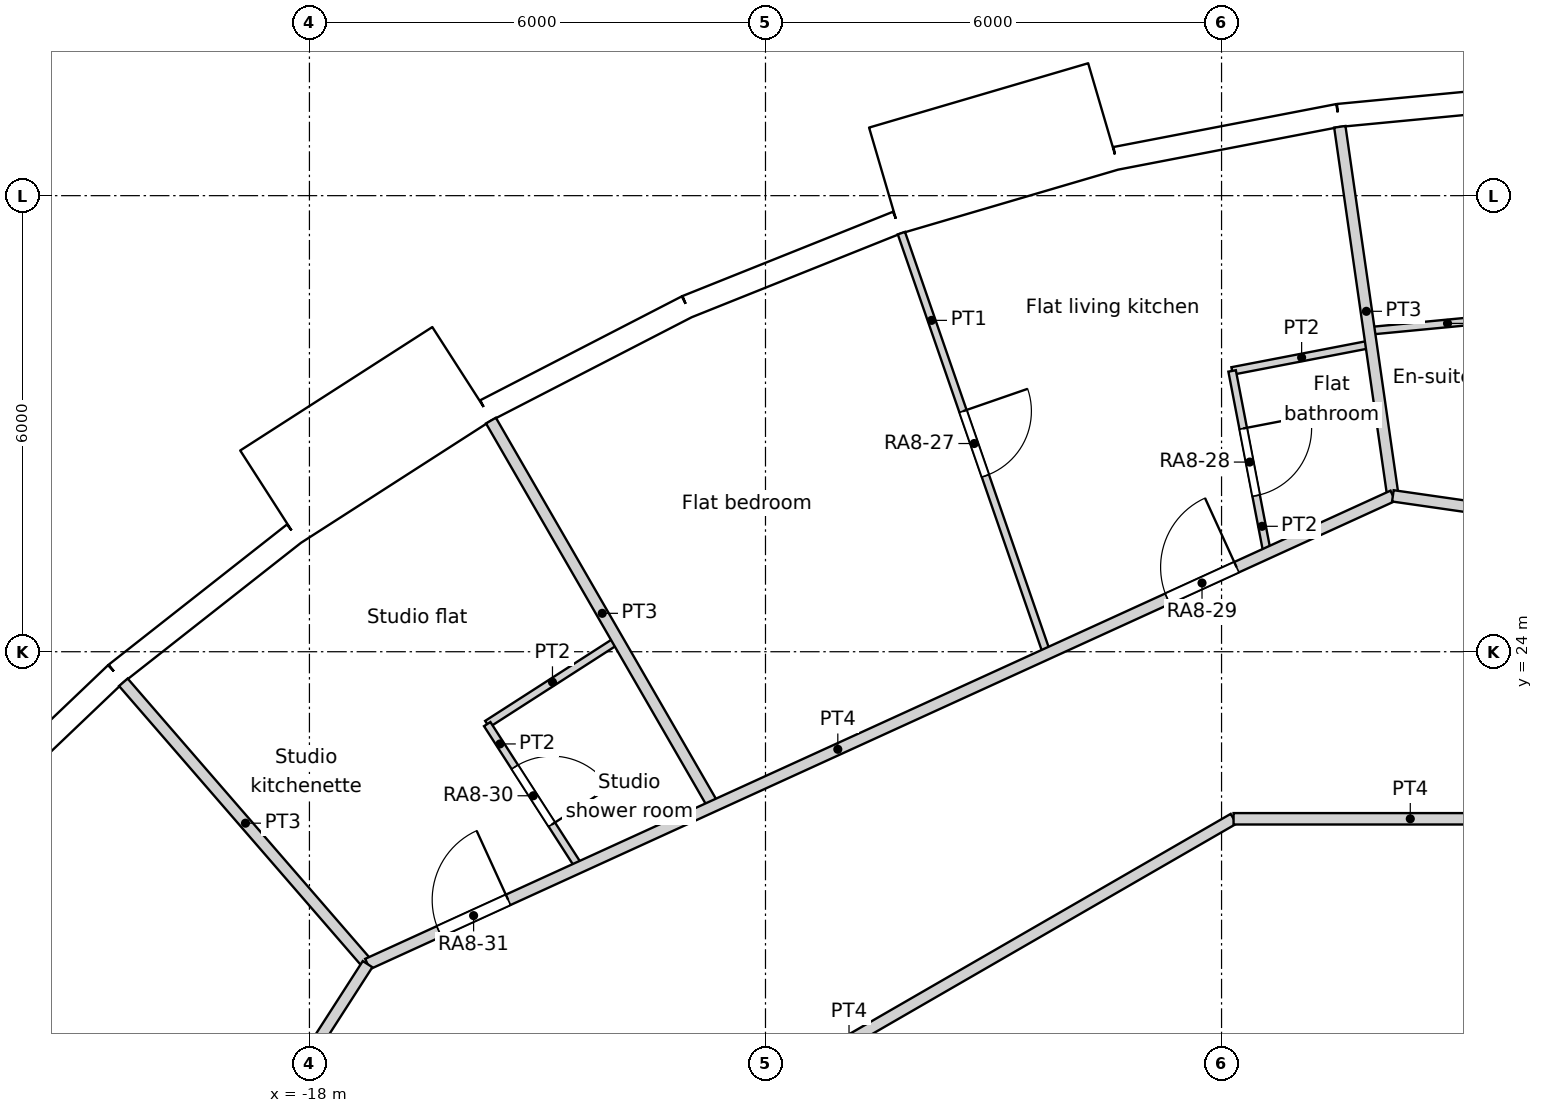
"""IFC4 building model, lengths in metres.
Left out: names, types, materials, properties, quantities, classifications, styles, units other than length and angle.
Written with IfcOpenShell. Run it as: python <this file> out.ifc"""

import sys

from ifc_helpers import new_model, si_unit, direction, frame, frame_2d, origin, origin_2d, place, context, subcontext, project, spatial, rectangle, circle, extrude, element, fill, save


model = new_model("IFC4")
c1 = context("Model", 3, precision=1e-05, world=origin(), true_north=direction((0.0, 1.0)))
c2 = subcontext(c1, "Body", "Model", "MODEL_VIEW")
j1 = project(units=[si_unit("LENGTHUNIT", "METRE"), si_unit("PLANEANGLEUNIT", "RADIAN")], contexts=[c1])
p1 = place(None, origin())
s1 = spatial("IfcSite", under=j1, at=p1, CompositionType="ELEMENT")
p2 = place(p1, origin())
s2 = spatial("IfcBuilding", under=s1, at=p2, CompositionType="ELEMENT")
p3 = place(p2, frame((0.0, 0.0, 103.8)))
s3 = spatial("IfcBuildingStorey", under=s2, at=p3, CompositionType="ELEMENT", Elevation=103.8)
for number, where, z_axis, x_axis in (
    (1, (-4.309, 29.966, 0.0), (0.0, 0.0, 1.0), (1.0, 0.0, 0.0)),
    (2, (-9.902, 28.61, 0.0), (0.0, 0.0, 1.0), (1.0, 0.0, 0.0)),
    (3, (-15.137, 26.219, 0.0), (0.0, 0.0, 1.0), (1.0, 0.0, 0.0)),
    (4, (-19.826, 22.88, 0.0), (0.0, 0.0, 1.0), (1.0, 0.0, 0.0)),
):
    element("IfcColumn", number, at=place(p3, frame(where, z_axis=z_axis, x_axis=x_axis)), inside=s3, PredefinedType="COLUMN", context=c2, shape_type="SweptSolid", body=[
        extrude(circle(Radius=0.6, at=origin_2d()), origin(), (0.0, 0.0, 1.0), 3.6),
    ])
for number, where, z_axis, x_axis in (
    (5, (-7.04, 23.516, 0.0), (0.0, 0.0, 1.0), (1.0, 0.0, 0.0)),
    (6, (-12.274, 21.259, 0.0), (0.0, 0.0, 1.0), (1.0, 0.0, 0.0)),
):
    element("IfcColumn", number, at=place(p3, frame(where, z_axis=z_axis, x_axis=x_axis)), inside=s3, PredefinedType="COLUMN", context=c2, shape_type="SweptSolid", body=[
        extrude(circle(Radius=0.65, at=origin_2d()), origin(), (0.0, 0.0, 1.0), 3.6),
    ])
p4 = place(p3, frame((-4.188, 18.35, 0.0), z_axis=(0.0, 0.0, 1.0), x_axis=(1.0, 0.0, 0.0)))
e7 = element("IfcColumn", 7, at=p4, inside=s3, PredefinedType="COLUMN", context=c2, shape_type="SweptSolid", body=[
    extrude(circle(Radius=0.7, at=origin_2d()), origin(), (0.0, 0.0, 1.0), 3.6),
])
p5 = place(p3, frame((-1.499, 31.338, 0.0), z_axis=(0.0, 0.0, 1.0), x_axis=(-0.995473351551, -0.095041077185, 0.0)))
e8 = element("IfcWall", 8, at=p5, inside=s3, PredefinedType="SOLIDWALL", context=c2, shape_type="SweptSolid", body=[
    extrude(rectangle(XDim=2.98, YDim=0.3, at=frame_2d((1.49, 0.0))), origin(), (0.0, 0.0, 1.0), 3.15),
])
p6 = place(p5, frame((1.49, 0.0, 1.55)))
e9 = element("IfcOpeningElement", 9, at=p6, cuts=e8, PredefinedType="OPENING", context=c2, shape_type="SweptSolid", body=[
    extrude(circle(Radius=0.9, at=origin_2d()), frame((0.0, 0.16, 0.0), z_axis=(0.0, -1.0, 0.0), x_axis=(1.0, 0.0, 0.0)), (0.0, 0.0, 1.0), 0.32),
])
p7 = place(p3, frame((-4.465, 31.055, 0.0), z_axis=(0.0, 0.0, 1.0), x_axis=(-0.981924535406, -0.189272836848, 0.0)))
e10 = element("IfcWall", 10, at=p7, inside=s3, PredefinedType="SOLIDWALL", context=c2, shape_type="SweptSolid", body=[
    extrude(rectangle(XDim=2.98, YDim=0.3, at=frame_2d((1.49, 0.0))), origin(), (0.0, 0.0, 1.0), 3.15),
])
p8 = place(p7, frame((1.49, 0.0, 1.55)))
e11 = element("IfcOpeningElement", 11, at=p8, cuts=e10, PredefinedType="OPENING", context=c2, shape_type="SweptSolid", body=[
    extrude(circle(Radius=0.9, at=origin_2d()), frame((0.0, 0.16, 0.0), z_axis=(0.0, -1.0, 0.0), x_axis=(1.0, 0.0, 0.0)), (0.0, 0.0, 1.0), 0.32),
])
p9 = place(p3, frame((-7.552, 31.044, -0.45), z_axis=(0.0, 0.0, 1.0), x_axis=(-0.959489813418, -0.281743319258, 0.0)))
e12 = element("IfcWall", 12, at=p9, inside=s3, PredefinedType="ELEMENTEDWALL", context=c2, shape_type="SweptSolid", body=[
    extrude(rectangle(XDim=3.0, YDim=1.45, at=frame_2d((1.5, 0.0))), origin(), (0.0, 0.0, 1.0), 3.6),
])
p10 = place(p9, frame((1.5, 0.0, 2.0)))
e13 = element("IfcOpeningElement", 13, at=p10, cuts=e12, PredefinedType="OPENING", context=c2, shape_type="SweptSolid", body=[
    extrude(circle(Radius=0.9, at=origin_2d()), frame((0.0, 0.735, 0.0), z_axis=(0.0, -1.0, 0.0), x_axis=(1.0, 0.0, 0.0)), (0.0, 0.0, 1.0), 1.47),
])
p11 = place(p3, frame((-10.267, 29.646, 0.0), z_axis=(0.0, 0.0, 1.0), x_axis=(-0.928403213937, -0.371574316054, 0.0)))
e14 = element("IfcWall", 14, at=p11, inside=s3, PredefinedType="SOLIDWALL", context=c2, shape_type="SweptSolid", body=[
    extrude(rectangle(XDim=2.98, YDim=0.3, at=frame_2d((1.49, 0.0))), origin(), (0.0, 0.0, 1.0), 3.15),
])
p12 = place(p11, frame((1.49, 0.0, 1.55)))
e15 = element("IfcOpeningElement", 15, at=p12, cuts=e14, PredefinedType="OPENING", context=c2, shape_type="SweptSolid", body=[
    extrude(circle(Radius=0.9, at=origin_2d()), frame((0.0, 0.16, 0.0), z_axis=(0.0, -1.0, 0.0), x_axis=(1.0, 0.0, 0.0)), (0.0, 0.0, 1.0), 0.32),
])
p13 = place(p3, frame((-13.033, 28.539, 0.0), z_axis=(0.0, 0.0, 1.0), x_axis=(-0.888819853856, -0.458256770153, 0.0)))
e16 = element("IfcWall", 16, at=p13, inside=s3, PredefinedType="SOLIDWALL", context=c2, shape_type="SweptSolid", body=[
    extrude(rectangle(XDim=2.98, YDim=0.3, at=frame_2d((1.49, 0.0))), origin(), (0.0, 0.0, 1.0), 3.15),
])
p14 = place(p13, frame((1.49, 0.0, 1.55)))
e17 = element("IfcOpeningElement", 17, at=p14, cuts=e16, PredefinedType="OPENING", context=c2, shape_type="SweptSolid", body=[
    extrude(circle(Radius=0.9, at=origin_2d()), frame((0.0, 0.16, 0.0), z_axis=(0.0, -1.0, 0.0), x_axis=(1.0, 0.0, 0.0)), (0.0, 0.0, 1.0), 0.32),
])
p15 = place(p3, frame((-15.992, 27.659, -0.45), z_axis=(0.0, 0.0, 1.0), x_axis=(-0.841223422347, -0.540687667415, 0.0)))
e18 = element("IfcWall", 18, at=p15, inside=s3, PredefinedType="ELEMENTEDWALL", context=c2, shape_type="SweptSolid", body=[
    extrude(rectangle(XDim=3.0, YDim=1.45, at=frame_2d((1.5, 0.0))), origin(), (0.0, 0.0, 1.0), 3.6),
])
p16 = place(p15, frame((1.5, 0.0, 2.0)))
e19 = element("IfcOpeningElement", 19, at=p16, cuts=e18, PredefinedType="OPENING", context=c2, shape_type="SweptSolid", body=[
    extrude(circle(Radius=0.9, at=origin_2d()), frame((0.0, 0.735, 0.0), z_axis=(0.0, -1.0, 0.0), x_axis=(1.0, 0.0, 0.0)), (0.0, 0.0, 1.0), 1.47),
])
p17 = place(p3, frame((-18.204, 25.553, 0.0), z_axis=(0.0, 0.0, 1.0), x_axis=(-0.786045331304, -0.618168858108, 0.0)))
e20 = element("IfcWall", 20, at=p17, inside=s3, PredefinedType="SOLIDWALL", context=c2, shape_type="SweptSolid", body=[
    extrude(rectangle(XDim=2.98, YDim=0.3, at=frame_2d((1.49, 0.0))), origin(), (0.0, 0.0, 1.0), 3.15),
])
p18 = place(p17, frame((1.49, 0.0, 1.55)))
e21 = element("IfcOpeningElement", 21, at=p18, cuts=e20, PredefinedType="OPENING", context=c2, shape_type="SweptSolid", body=[
    extrude(circle(Radius=0.9, at=origin_2d()), frame((0.0, 0.16, 0.0), z_axis=(0.0, -1.0, 0.0), x_axis=(1.0, 0.0, 0.0)), (0.0, 0.0, 1.0), 0.32),
])
p19 = place(p3, frame((-20.546, 23.711, 0.0), z_axis=(0.0, 0.0, 1.0), x_axis=(-0.723744206617, -0.690068346896, 0.0)))
e22 = element("IfcWall", 22, at=p19, inside=s3, PredefinedType="SOLIDWALL", context=c2, shape_type="SweptSolid", body=[
    extrude(rectangle(XDim=2.98, YDim=0.3, at=frame_2d((1.49, 0.0))), origin(), (0.0, 0.0, 1.0), 3.15),
])
p20 = place(p19, frame((1.49, 0.0, 1.55)))
e23 = element("IfcOpeningElement", 23, at=p20, cuts=e22, PredefinedType="OPENING", context=c2, shape_type="SweptSolid", body=[
    extrude(circle(Radius=0.9, at=origin_2d()), frame((0.0, 0.16, 0.0), z_axis=(0.0, -1.0, 0.0), x_axis=(1.0, 0.0, 0.0)), (0.0, 0.0, 1.0), 0.32),
])
p21 = place(p3, frame((-5.842, 21.802, 0.0), z_axis=(0.0, 0.0, 1.0), x_axis=(1.0, 0.0, 0.0)))
e24 = element("IfcWall", 24, at=p21, inside=s3, PredefinedType="PARTITIONING", context=c2, shape_type="SweptSolid", body=[
    extrude(rectangle(XDim=4.65, YDim=0.15, at=frame_2d((2.325, 0.0))), origin(), (0.0, 0.0, 1.0), 3.15),
])
p22 = place(p3, frame((-15.96, 15.96, 0.0), z_axis=(0.0, 0.0, 1.0), x_axis=(0.866022730501, 0.500004630234, 0.0)))
e25 = element("IfcWall", 25, at=p22, inside=s3, PredefinedType="PARTITIONING", context=c2, shape_type="SweptSolid", body=[
    extrude(rectangle(XDim=11.684, YDim=0.15, at=frame_2d((5.842, 0.0))), origin(), (0.0, 0.0, 1.0), 3.15),
])
p23 = place(p3, frame((-3.746, 26.051, 0.0), z_axis=(0.0, 0.0, 1.0), x_axis=(0.989821009857, -0.142317843033, 0.0)))
e26 = element("IfcWall", 26, at=p23, inside=s3, PredefinedType="PARTITIONING", context=c2, shape_type="SweptSolid", body=[
    extrude(rectangle(XDim=14.83, YDim=0.15, at=frame_2d((7.415, 0.0))), origin(), (0.0, 0.0, 1.0), 3.15),
])
p24 = place(p23, frame((9.265, 0.0, 0.0)))
e27 = element("IfcOpeningElement", 27, at=p24, cuts=e26, PredefinedType="OPENING", context=c2, shape_type="SweptSolid", body=[
    extrude(rectangle(XDim=1.8, YDim=2.1, at=frame_2d((0.9, 1.05))), frame((0.0, 0.075, 0.0), z_axis=(0.0, -1.0, 0.0), x_axis=(1.0, 0.0, 0.0)), (0.0, 0.0, 1.0), 0.15),
])
p25 = place(p23, frame((3.214, 0.0, 0.0)))
e28 = element("IfcOpeningElement", 28, at=p25, cuts=e26, PredefinedType="OPENING", context=c2, shape_type="SweptSolid", body=[
    extrude(rectangle(XDim=1.0, YDim=2.1, at=frame_2d((0.5, 1.05))), frame((0.0, 0.075, 0.0), z_axis=(0.0, -1.0, 0.0), x_axis=(1.0, 0.0, 0.0)), (0.0, 0.0, 1.0), 0.15),
])
p26 = place(p3, frame((-17.236, 19.891, 0.0), z_axis=(0.0, 0.0, 1.0), x_axis=(0.909645678785, 0.415385049163, 0.0)))
e29 = element("IfcWall", 29, at=p26, inside=s3, PredefinedType="PARTITIONING", context=c2, shape_type="SweptSolid", body=[
    extrude(rectangle(XDim=14.829, YDim=0.15, at=frame_2d((7.415, 0.0))), origin(), (0.0, 0.0, 1.0), 3.15),
])
p27 = place(p26, frame((11.569, 0.0, 0.0)))
e30 = element("IfcOpeningElement", 30, at=p27, cuts=e29, PredefinedType="OPENING", context=c2, shape_type="SweptSolid", body=[
    extrude(rectangle(XDim=1.0, YDim=2.1, at=frame_2d((0.5, 1.05))), frame((0.0, 0.075, 0.0), z_axis=(0.0, -1.0, 0.0), x_axis=(1.0, 0.0, 0.0)), (0.0, 0.0, 1.0), 0.15),
])
p28 = place(p26, frame((1.034, 0.0, 0.0)))
e31 = element("IfcOpeningElement", 31, at=p28, cuts=e29, PredefinedType="OPENING", context=c2, shape_type="SweptSolid", body=[
    extrude(rectangle(XDim=1.0, YDim=2.1, at=frame_2d((0.5, 1.05))), frame((0.0, 0.075, 0.0), z_axis=(0.0, -1.0, 0.0), x_axis=(1.0, 0.0, 0.0)), (0.0, 0.0, 1.0), 0.15),
])
p29 = place(p3, frame((-25.255, 7.416, 0.0), z_axis=(0.0, 0.0, 1.0), x_axis=(0.540805851332, 0.841147449123, 0.0)))
e32 = element("IfcWall", 32, at=p29, inside=s3, PredefinedType="PARTITIONING", context=c2, shape_type="SweptSolid", body=[
    extrude(rectangle(XDim=14.829, YDim=0.15, at=frame_2d((7.415, 0.0))), origin(), (0.0, 0.0, 1.0), 3.15),
])
p30 = place(p29, frame((8.754, 0.0, 0.0)))
e33 = element("IfcOpeningElement", 33, at=p30, cuts=e32, PredefinedType="OPENING", context=c2, shape_type="SweptSolid", body=[
    extrude(rectangle(XDim=1.0, YDim=2.04, at=frame_2d((0.5, 1.02))), frame((0.0, 0.075, 0.0), z_axis=(0.0, -1.0, 0.0), x_axis=(1.0, 0.0, 0.0)), (0.0, 0.0, 1.0), 0.15),
])
p31 = place(p29, frame((0.316, 0.0, 0.0)))
e34 = element("IfcOpeningElement", 34, at=p31, cuts=e32, PredefinedType="OPENING", context=c2, shape_type="SweptSolid", body=[
    extrude(rectangle(XDim=1.0, YDim=2.1, at=frame_2d((0.5, 1.05))), frame((0.0, 0.075, 0.0), z_axis=(0.0, -1.0, 0.0), x_axis=(1.0, 0.0, 0.0)), (0.0, 0.0, 1.0), 0.15),
])
p32 = place(p3, frame((-4.058, 28.221, 0.0), z_axis=(0.0, 0.0, 1.0), x_axis=(0.995466291052, 0.095115000814, 0.0)))
e35 = element("IfcWall", 35, at=p32, inside=s3, PredefinedType="PARTITIONING", context=c2, shape_type="SweptSolid", body=[
    extrude(rectangle(XDim=2.071, YDim=0.1, at=frame_2d((1.036, 0.0))), origin(), (0.0, 0.0, 1.0), 3.15),
])
p33 = place(p3, frame((-4.444, 30.906, 0.0), z_axis=(0.0, 0.0, 1.0), x_axis=(0.142306296561, -0.989822669956, 0.0)))
e36 = element("IfcWall", 36, at=p33, inside=s3, PredefinedType="PARTITIONING", context=c2, shape_type="SweptSolid", body=[
    extrude(rectangle(XDim=4.905, YDim=0.15, at=frame_2d((2.452, 0.0))), origin(), (0.0, 0.0, 1.0), 3.15),
])
p34 = place(p3, frame((-10.212, 29.507, 0.0), z_axis=(0.0, 0.0, 1.0), x_axis=(0.32692444056, -0.94505048022, 0.0)))
e37 = element("IfcWall", 37, at=p34, inside=s3, PredefinedType="PARTITIONING", context=c2, shape_type="SweptSolid", body=[
    extrude(rectangle(XDim=5.857, YDim=0.1, at=frame_2d((2.928, 0.0))), origin(), (0.0, 0.0, 1.0), 3.15),
])
p35 = place(p34, frame((2.479, 0.0, 0.0)))
e38 = element("IfcOpeningElement", 38, at=p35, cuts=e37, PredefinedType="OPENING", context=c2, shape_type="SweptSolid", body=[
    extrude(rectangle(XDim=0.9, YDim=2.1, at=frame_2d((0.45, 1.05))), frame((0.0, 0.05, 0.0), z_axis=(0.0, -1.0, 0.0), x_axis=(1.0, 0.0, 0.0)), (0.0, 0.0, 1.0), 0.1),
])
p36 = place(p3, frame((-5.861, 27.694, 0.0), z_axis=(0.0, 0.0, 1.0), x_axis=(0.981879093558, 0.189508431565, 0.0)))
e39 = element("IfcWall", 39, at=p36, inside=s3, PredefinedType="PARTITIONING", context=c2, shape_type="SweptSolid", body=[
    extrude(rectangle(XDim=1.863, YDim=0.1, at=frame_2d((0.931, 0.0))), origin(), (0.0, 0.0, 1.0), 3.15),
])
p37 = place(p3, frame((-5.861, 27.694, 0.0), z_axis=(0.0, 0.0, 1.0), x_axis=(0.189229262293, -0.981932933704, 0.0)))
e40 = element("IfcWall", 40, at=p37, inside=s3, PredefinedType="PARTITIONING", context=c2, shape_type="SweptSolid", body=[
    extrude(rectangle(XDim=2.442, YDim=0.1, at=frame_2d((1.221, 0.0))), origin(), (0.0, 0.0, 1.0), 3.15),
])
p38 = place(p37, frame((0.771, 0.0, 0.0)))
e41 = element("IfcOpeningElement", 41, at=p38, cuts=e40, PredefinedType="OPENING", context=c2, shape_type="SweptSolid", body=[
    extrude(rectangle(XDim=0.9, YDim=2.0, at=frame_2d((0.45, 1.0))), frame((0.0, 0.05, 0.0), z_axis=(0.0, -1.0, 0.0), x_axis=(1.0, 0.0, 0.0)), (0.0, 0.0, 1.0), 0.1),
])
p39 = place(p3, frame((-15.612, 27.041, 0.0), z_axis=(0.0, 0.0, 1.0), x_axis=(0.50008450438, -0.86597660966, 0.0)))
e42 = element("IfcWall", 42, at=p39, inside=s3, PredefinedType="PARTITIONING", context=c2, shape_type="SweptSolid", body=[
    extrude(rectangle(XDim=5.856, YDim=0.15, at=frame_2d((2.928, 0.0))), origin(), (0.0, 0.0, 1.0), 3.15),
])
p40 = place(p3, frame((-15.661, 23.048, 0.0), z_axis=(0.0, 0.0, 1.0), x_axis=(0.84110074148, 0.540878491606, 0.0)))
e43 = element("IfcWall", 43, at=p40, inside=s3, PredefinedType="PARTITIONING", context=c2, shape_type="SweptSolid", body=[
    extrude(rectangle(XDim=2.041, YDim=0.1, at=frame_2d((1.021, 0.0))), origin(), (0.0, 0.0, 1.0), 3.15),
])
p41 = place(p3, frame((-15.661, 23.048, 0.0), z_axis=(0.0, 0.0, 1.0), x_axis=(0.540796133976, -0.841153696702, 0.0)))
e44 = element("IfcWall", 44, at=p41, inside=s3, PredefinedType="PARTITIONING", context=c2, shape_type="SweptSolid", body=[
    extrude(rectangle(XDim=2.241, YDim=0.1, at=frame_2d((1.121, 0.0))), origin(), (0.0, 0.0, 1.0), 3.15),
])
p42 = place(p41, frame((0.671, 0.0, 0.0)))
e45 = element("IfcOpeningElement", 45, at=p42, cuts=e44, PredefinedType="OPENING", context=c2, shape_type="SweptSolid", body=[
    extrude(rectangle(XDim=0.9, YDim=2.04, at=frame_2d((0.45, 1.02))), frame((0.0, 0.05, 0.0), z_axis=(0.0, -1.0, 0.0), x_axis=(1.0, 0.0, 0.0)), (0.0, 0.0, 1.0), 0.1),
])
p43 = place(p3, frame((-20.448, 23.598, 0.0), z_axis=(0.0, 0.0, 1.0), x_axis=(0.654953271538, -0.755669380153, 0.0)))
e46 = element("IfcWall", 46, at=p43, inside=s3, PredefinedType="PARTITIONING", context=c2, shape_type="SweptSolid", body=[
    extrude(rectangle(XDim=4.906, YDim=0.15, at=frame_2d((2.453, 0.0))), origin(), (0.0, 0.0, 1.0), 3.15),
])
p44 = place(p6, origin())
e47 = element("IfcWindow", 47, at=p44, inside=s3, PartitioningType="SINGLE_PANEL", PredefinedType="WINDOW", context=c2, shape_type="SweptSolid", body=[
    extrude(circle(Radius=0.9, at=origin_2d()), frame((0.0, 0.12, 0.0), z_axis=(0.0, -1.0, 0.0), x_axis=(1.0, 0.0, 0.0)), (0.0, 0.0, 1.0), 0.1),
])
fill(e9, e47)
p45 = place(p8, origin())
e48 = element("IfcWindow", 48, at=p45, inside=s3, PartitioningType="SINGLE_PANEL", PredefinedType="WINDOW", context=c2, shape_type="SweptSolid", body=[
    extrude(circle(Radius=0.9, at=origin_2d()), frame((0.0, 0.12, 0.0), z_axis=(0.0, -1.0, 0.0), x_axis=(1.0, 0.0, 0.0)), (0.0, 0.0, 1.0), 0.1),
])
fill(e11, e48)
p46 = place(p10, origin())
e49 = element("IfcWindow", 49, at=p46, inside=s3, PartitioningType="SINGLE_PANEL", PredefinedType="WINDOW", context=c2, shape_type="SweptSolid", body=[
    extrude(circle(Radius=0.9, at=origin_2d()), frame((0.0, 0.695, 0.0), z_axis=(0.0, -1.0, 0.0), x_axis=(1.0, 0.0, 0.0)), (0.0, 0.0, 1.0), 0.1),
])
fill(e13, e49)
p47 = place(p12, origin())
e50 = element("IfcWindow", 50, at=p47, inside=s3, PartitioningType="SINGLE_PANEL", PredefinedType="WINDOW", context=c2, shape_type="SweptSolid", body=[
    extrude(circle(Radius=0.9, at=origin_2d()), frame((0.0, 0.12, 0.0), z_axis=(0.0, -1.0, 0.0), x_axis=(1.0, 0.0, 0.0)), (0.0, 0.0, 1.0), 0.1),
])
fill(e15, e50)
p48 = place(p14, origin())
e51 = element("IfcWindow", 51, at=p48, inside=s3, PartitioningType="SINGLE_PANEL", PredefinedType="WINDOW", context=c2, shape_type="SweptSolid", body=[
    extrude(circle(Radius=0.9, at=origin_2d()), frame((0.0, 0.12, 0.0), z_axis=(0.0, -1.0, 0.0), x_axis=(1.0, 0.0, 0.0)), (0.0, 0.0, 1.0), 0.1),
])
fill(e17, e51)
p49 = place(p16, origin())
e52 = element("IfcWindow", 52, at=p49, inside=s3, PartitioningType="SINGLE_PANEL", PredefinedType="WINDOW", context=c2, shape_type="SweptSolid", body=[
    extrude(circle(Radius=0.9, at=origin_2d()), frame((0.0, 0.695, 0.0), z_axis=(0.0, -1.0, 0.0), x_axis=(1.0, 0.0, 0.0)), (0.0, 0.0, 1.0), 0.1),
])
fill(e19, e52)
p50 = place(p18, origin())
e53 = element("IfcWindow", 53, at=p50, inside=s3, PartitioningType="SINGLE_PANEL", PredefinedType="WINDOW", context=c2, shape_type="SweptSolid", body=[
    extrude(circle(Radius=0.9, at=origin_2d()), frame((0.0, 0.12, 0.0), z_axis=(0.0, -1.0, 0.0), x_axis=(1.0, 0.0, 0.0)), (0.0, 0.0, 1.0), 0.1),
])
fill(e21, e53)
p51 = place(p20, origin())
e54 = element("IfcWindow", 54, at=p51, inside=s3, PartitioningType="SINGLE_PANEL", PredefinedType="WINDOW", context=c2, shape_type="SweptSolid", body=[
    extrude(circle(Radius=0.9, at=origin_2d()), frame((0.0, 0.12, 0.0), z_axis=(0.0, -1.0, 0.0), x_axis=(1.0, 0.0, 0.0)), (0.0, 0.0, 1.0), 0.1),
])
fill(e23, e54)
p52 = place(p35, origin())
e55 = element("IfcDoor", 55, at=p52, inside=s3, OperationType="SINGLE_SWING_LEFT", PredefinedType="DOOR", context=c2, shape_type="SweptSolid", body=[
    extrude(rectangle(XDim=0.9, YDim=2.1, at=frame_2d((0.45, 1.05))), frame((0.0, 0.025, 0.0), z_axis=(0.0, -1.0, 0.0), x_axis=(1.0, 0.0, 0.0)), (0.0, 0.0, 1.0), 0.05),
])
fill(e38, e55)
p53 = place(p38, origin())
e56 = element("IfcDoor", 56, at=p53, inside=s3, OperationType="SINGLE_SWING_LEFT", PredefinedType="DOOR", context=c2, shape_type="SweptSolid", body=[
    extrude(rectangle(XDim=0.9, YDim=2.0, at=frame_2d((0.45, 1.0))), frame((0.0, 0.025, 0.0), z_axis=(0.0, -1.0, 0.0), x_axis=(1.0, 0.0, 0.0)), (0.0, 0.0, 1.0), 0.05),
])
fill(e41, e56)
p54 = place(p27, origin())
e57 = element("IfcDoor", 57, at=p54, inside=s3, OperationType="SINGLE_SWING_RIGHT", PredefinedType="DOOR", context=c2, shape_type="SweptSolid", body=[
    extrude(rectangle(XDim=1.0, YDim=2.1, at=frame_2d((0.5, 1.05))), frame((0.0, 0.025, 0.0), z_axis=(0.0, -1.0, 0.0), x_axis=(1.0, 0.0, 0.0)), (0.0, 0.0, 1.0), 0.05),
])
fill(e30, e57)
p55 = place(p42, origin())
e58 = element("IfcDoor", 58, at=p55, inside=s3, OperationType="SINGLE_SWING_RIGHT", PredefinedType="DOOR", context=c2, shape_type="SweptSolid", body=[
    extrude(rectangle(XDim=0.9, YDim=2.04, at=frame_2d((0.45, 1.02))), frame((0.0, 0.025, 0.0), z_axis=(0.0, -1.0, 0.0), x_axis=(1.0, 0.0, 0.0)), (0.0, 0.0, 1.0), 0.05),
])
fill(e45, e58)
p56 = place(p28, origin())
e59 = element("IfcDoor", 59, at=p56, inside=s3, OperationType="SINGLE_SWING_RIGHT", PredefinedType="DOOR", context=c2, shape_type="SweptSolid", body=[
    extrude(rectangle(XDim=1.0, YDim=2.1, at=frame_2d((0.5, 1.05))), frame((0.0, 0.025, 0.0), z_axis=(0.0, -1.0, 0.0), x_axis=(1.0, 0.0, 0.0)), (0.0, 0.0, 1.0), 0.05),
])
fill(e31, e59)
save(model, sys.argv[1])
